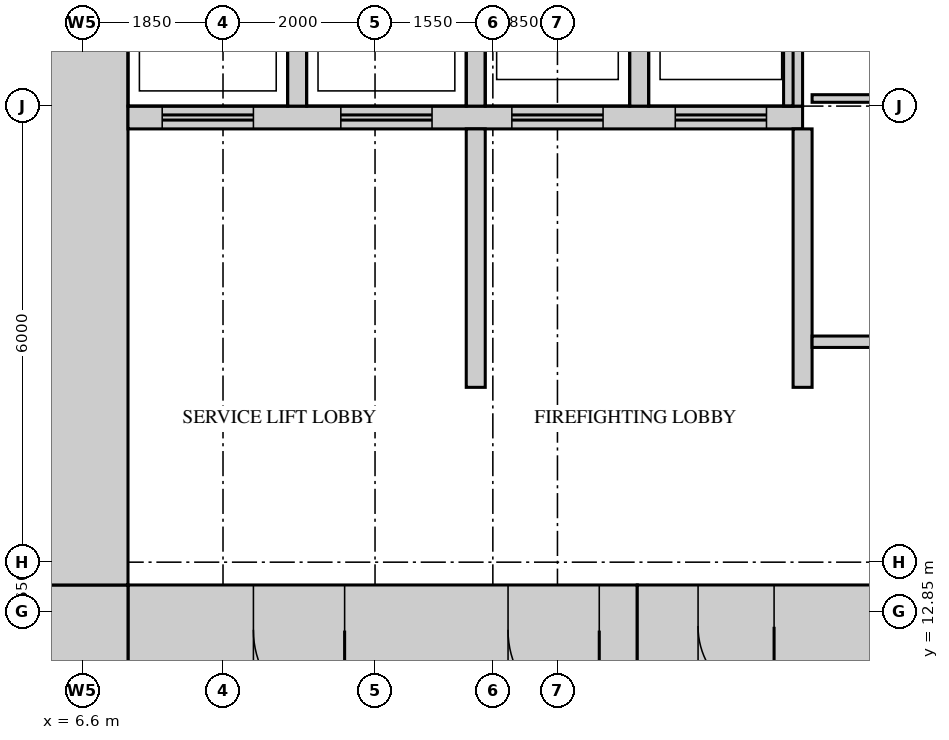
"""IFC4 building model, lengths in metres.
Left out: names, types, materials, properties, quantities, classifications, styles, units other than length and angle.
Written with IfcOpenShell. Run it as: python <this file> out.ifc"""

import sys

from ifc_helpers import new_model, si_unit, direction, frame, frame_2d, origin, place, context, subcontext, project, spatial, rectangle, extrude, source, transform, mapped, element, fill, save


model = new_model("IFC4")
c1 = context("Model", 3, precision=1e-05, world=origin(), true_north=direction((0.0, 1.0)))
c2 = subcontext(c1, "Body", "Model", "MODEL_VIEW")
j1 = project(units=[si_unit("LENGTHUNIT", "METRE"), si_unit("PLANEANGLEUNIT", "RADIAN")], contexts=[c1])
p1 = place(None, origin())
s1 = spatial("IfcSite", under=j1, at=p1, CompositionType="ELEMENT")
p2 = place(p1, origin())
s2 = spatial("IfcBuilding", under=s1, at=p2, CompositionType="ELEMENT")
p3 = place(p2, frame((0.0, 0.0, 51.0)))
s3 = spatial("IfcBuildingStorey", under=s2, at=p3, CompositionType="ELEMENT", Elevation=51.0)
m1 = source(origin(), c2, "Body", "SweptSolid", [
    extrude(rectangle(XDim=6.7, YDim=1.2, at=frame_2d((3.35, 0.0))), origin(), (0.0, 0.0, 1.0), 4.2),
])
p4 = place(p3, frame((7.2, 12.6, 0.0), z_axis=(0.0, 0.0, 1.0), x_axis=(1.0, 0.0, 0.0)))
e1 = element("IfcWall", 1, at=p4, inside=s3, PredefinedType="SHEAR", context=c2, shape_type="MappedRepresentation", body=[
    mapped(m1, transform((0.0, 0.0, 0.0))),
])
m2 = source(origin(), c2, "Body", "SweptSolid", [
    extrude(rectangle(XDim=1.2, YDim=2.1, at=frame_2d((0.6, 1.05))), frame((0.0, 0.61, 0.0), z_axis=(0.0, -1.0, 0.0), x_axis=(1.0, 0.0, 0.0)), (0.0, 0.0, 1.0), 1.22),
])
p5 = place(p4, frame((5.0, 0.0, 0.0)))
e2 = element("IfcOpeningElement", 2, at=p5, cuts=e1, PredefinedType="OPENING", context=c2, shape_type="MappedRepresentation", body=[
    mapped(m2, transform((0.0, 0.0, 0.0))),
])
p6 = place(p4, frame((1.65, 0.0, 0.0)))
e3 = element("IfcOpeningElement", 3, at=p6, cuts=e1, PredefinedType="OPENING", context=c2, shape_type="MappedRepresentation", body=[
    mapped(m2, transform((0.0, 0.0, 0.0))),
])
m3 = source(origin(), c2, "Body", "SweptSolid", [
    extrude(rectangle(XDim=7.2, YDim=1.1, at=frame_2d((3.6, 0.0))), origin(), (0.0, 0.0, 1.0), 4.2),
])
p7 = place(p3, frame((13.9, 12.65, 0.0), z_axis=(0.0, 0.0, 1.0), x_axis=(1.0, 0.0, 0.0)))
e4 = element("IfcWall", 4, at=p7, inside=s3, PredefinedType="SHEAR", context=c2, shape_type="MappedRepresentation", body=[
    mapped(m3, transform((0.0, 0.0, 0.0))),
])
m4 = source(origin(), c2, "Body", "SweptSolid", [
    extrude(rectangle(XDim=1.0, YDim=2.1, at=frame_2d((0.5, 1.05))), frame((0.0, 0.56, 0.0), z_axis=(0.0, -1.0, 0.0), x_axis=(1.0, 0.0, 0.0)), (0.0, 0.0, 1.0), 1.12),
])
p8 = place(p7, frame((0.8, 0.0, 0.0)))
e5 = element("IfcOpeningElement", 5, at=p8, cuts=e4, PredefinedType="OPENING", context=c2, shape_type="MappedRepresentation", body=[
    mapped(m4, transform((0.0, 0.0, 0.0))),
])
m5 = source(origin(), c2, "Body", "SweptSolid", [
    extrude(rectangle(XDim=1.2, YDim=1.2, at=frame_2d((0.6, 0.0))), origin(), (0.0, 0.0, 1.0), 4.2),
])
p9 = place(p3, frame((6.0, 12.6, 0.0), z_axis=(0.0, 0.0, 1.0), x_axis=(1.0, 0.0, 0.0)))
e6 = element("IfcWall", 6, at=p9, inside=s3, PredefinedType="SHEAR", context=c2, shape_type="MappedRepresentation", body=[
    mapped(m5, transform((0.0, 0.0, 0.0))),
])
m6 = source(origin(), c2, "Body", "SweptSolid", [
    extrude(rectangle(XDim=27.6, YDim=1.2, at=frame_2d((13.8, 0.0))), origin(), (0.0, 0.0, 1.0), 4.2),
])
p10 = place(p3, frame((6.6, 13.2, 0.0), z_axis=(0.0, 0.0, 1.0), x_axis=(0.0, 1.0, 0.0)))
e7 = element("IfcWall", 7, at=p10, inside=s3, PredefinedType="SHEAR", context=c2, shape_type="MappedRepresentation", body=[
    mapped(m6, transform((0.0, 0.0, 0.0))),
])
m7 = source(origin(), c2, "Body", "SweptSolid", [
    extrude(rectangle(XDim=8.875, YDim=0.3, at=frame_2d((4.438, 0.0))), origin(), (0.0, 0.0, 1.0), 4.2),
])
p11 = place(p3, frame((7.2, 19.35, 0.0), z_axis=(0.0, 0.0, 1.0), x_axis=(1.0, 0.0, 0.0)))
e8 = element("IfcWall", 8, at=p11, inside=s3, PredefinedType="STANDARD", context=c2, shape_type="MappedRepresentation", body=[
    mapped(m7, transform((0.0, 0.0, 0.0))),
])
m8 = source(origin(), c2, "Body", "SweptSolid", [
    extrude(rectangle(XDim=1.2, YDim=2.1, at=frame_2d((0.6, 1.05))), frame((0.0, 0.16, 0.0), z_axis=(0.0, -1.0, 0.0), x_axis=(1.0, 0.0, 0.0)), (0.0, 0.0, 1.0), 0.32),
])
p12 = place(p11, frame((0.45, 0.0, 0.0)))
e9 = element("IfcOpeningElement", 9, at=p12, cuts=e8, PredefinedType="OPENING", context=c2, shape_type="MappedRepresentation", body=[
    mapped(m8, transform((0.0, 0.0, 0.0))),
])
p13 = place(p11, frame((2.8, 0.0, 0.0)))
e10 = element("IfcOpeningElement", 10, at=p13, cuts=e8, PredefinedType="OPENING", context=c2, shape_type="MappedRepresentation", body=[
    mapped(m8, transform((0.0, 0.0, 0.0))),
])
p14 = place(p11, frame((5.05, 0.0, 0.0)))
e11 = element("IfcOpeningElement", 11, at=p14, cuts=e8, PredefinedType="OPENING", context=c2, shape_type="MappedRepresentation", body=[
    mapped(m8, transform((0.0, 0.0, 0.0))),
])
p15 = place(p11, frame((7.2, 0.0, 0.0)))
e12 = element("IfcOpeningElement", 12, at=p15, cuts=e8, PredefinedType="OPENING", context=c2, shape_type="MappedRepresentation", body=[
    mapped(m8, transform((0.0, 0.0, 0.0))),
])
m9 = source(origin(), c2, "Body", "SweptSolid", [
    extrude(rectangle(XDim=3.1, YDim=0.25, at=frame_2d((1.55, 0.0))), origin(), (0.0, 0.0, 1.0), 4.2),
])
for number, where, z_axis, x_axis in (
    (13, (9.425, 19.5, 0.0), (0.0, 0.0, 1.0), (0.0, 1.0, 0.0)),
    (14, (11.775, 19.5, 0.0), (0.0, 0.0, 1.0), (0.0, 1.0, 0.0)),
    (15, (13.925, 19.5, 0.0), (0.0, 0.0, 1.0), (0.0, 1.0, 0.0)),
    (16, (15.95, 19.5, 0.0), (0.0, 0.0, 1.0), (0.0, 1.0, 0.0)),
):
    element("IfcWall", number, at=place(p3, frame(where, z_axis=z_axis, x_axis=x_axis)), inside=s3, PredefinedType="STANDARD", context=c2, shape_type="MappedRepresentation", body=[
        mapped(m9, transform((0.0, 0.0, 0.0))),
    ])
m10 = source(origin(), c2, "Body", "SweptSolid", [
    extrude(rectangle(XDim=3.4, YDim=0.25, at=frame_2d((1.7, 0.0))), origin(), (0.0, 0.0, 1.0), 4.2),
])
for number, where, z_axis, x_axis in (
    (17, (16.075, 15.8, 0.0), (0.0, 0.0, 1.0), (0.0, 1.0, 0.0)),
    (18, (11.775, 15.8, 0.0), (0.0, 0.0, 1.0), (0.0, 1.0, 0.0)),
):
    element("IfcWall", number, at=place(p3, frame(where, z_axis=z_axis, x_axis=x_axis)), inside=s3, PredefinedType="STANDARD", context=c2, shape_type="MappedRepresentation", body=[
        mapped(m10, transform((0.0, 0.0, 0.0))),
    ])
m11 = source(origin(), c2, "Body", "SweptSolid", [
    extrude(rectangle(XDim=6.6, YDim=0.15, at=frame_2d((3.3, 0.0))), origin(), (0.0, 0.0, 1.0), 4.3),
])
p16 = place(p3, frame((16.2, 16.4, 0.0), z_axis=(0.0, 0.0, 1.0), x_axis=(1.0, 0.0, 0.0)))
e19 = element("IfcWall", 19, at=p16, inside=s3, PredefinedType="PARTITIONING", context=c2, shape_type="MappedRepresentation", body=[
    mapped(m11, transform((0.0, 0.0, 0.0))),
])
m12 = source(origin(), c2, "Body", "SweptSolid", [
    extrude(rectangle(XDim=6.6, YDim=0.1, at=frame_2d((3.3, 0.0))), origin(), (0.0, 0.0, 1.0), 4.3),
])
p17 = place(p3, frame((16.2, 19.6, 0.0), z_axis=(0.0, 0.0, 1.0), x_axis=(1.0, 0.0, 0.0)))
e20 = element("IfcWall", 20, at=p17, inside=s3, PredefinedType="PARTITIONING", context=c2, shape_type="MappedRepresentation", body=[
    mapped(m12, transform((0.0, 0.0, 0.0))),
])
m13 = source(origin(), c2, "Body", "SweptSolid", [
    extrude(rectangle(XDim=1.2, YDim=2.1, at=frame_2d((0.6, 1.05))), frame((0.0, 0.55, 0.0), z_axis=(0.0, -1.0, 0.0), x_axis=(1.0, 0.0, 0.0)), (0.0, 0.0, 1.0), 1.1),
])
p18 = place(p5, origin())
e21 = element("IfcDoor", 21, at=p18, inside=s3, OperationType="SINGLE_SWING_RIGHT", PredefinedType="DOOR", context=c2, shape_type="MappedRepresentation", body=[
    mapped(m13, transform((0.0, 0.0, 0.0))),
])
fill(e2, e21)
p19 = place(p6, origin())
e22 = element("IfcDoor", 22, at=p19, inside=s3, OperationType="SINGLE_SWING_RIGHT", PredefinedType="DOOR", context=c2, shape_type="MappedRepresentation", body=[
    mapped(m13, transform((0.0, 0.0, 0.0))),
])
fill(e3, e22)
m14 = source(origin(), c2, "Body", "SweptSolid", [
    extrude(rectangle(XDim=1.0, YDim=2.1, at=frame_2d((0.5, 1.05))), frame((0.0, 0.5, 0.0), z_axis=(0.0, -1.0, 0.0), x_axis=(1.0, 0.0, 0.0)), (0.0, 0.0, 1.0), 1.0),
])
p20 = place(p8, origin())
e23 = element("IfcDoor", 23, at=p20, inside=s3, OperationType="SINGLE_SWING_RIGHT", PredefinedType="DOOR", context=c2, shape_type="MappedRepresentation", body=[
    mapped(m14, transform((0.0, 0.0, 0.0))),
])
fill(e5, e23)
m15 = source(origin(), c2, "Body", "SweptSolid", [
    extrude(rectangle(XDim=1.2, YDim=2.1, at=frame_2d((0.6, 1.05))), frame((0.0, 0.025, 0.0), z_axis=(0.0, -1.0, 0.0), x_axis=(1.0, 0.0, 0.0)), (0.0, 0.0, 1.0), 0.05),
])
p21 = place(p12, origin())
e24 = element("IfcDoor", 24, at=p21, inside=s3, OperationType="DOUBLE_DOOR_SLIDING", PredefinedType="DOOR", context=c2, shape_type="MappedRepresentation", body=[
    mapped(m15, transform((0.0, 0.0, 0.0))),
])
fill(e9, e24)
p22 = place(p13, origin())
e25 = element("IfcDoor", 25, at=p22, inside=s3, OperationType="DOUBLE_DOOR_SLIDING", PredefinedType="DOOR", context=c2, shape_type="MappedRepresentation", body=[
    mapped(m15, transform((0.0, 0.0, 0.0))),
])
fill(e10, e25)
p23 = place(p14, origin())
e26 = element("IfcDoor", 26, at=p23, inside=s3, OperationType="DOUBLE_DOOR_SLIDING", PredefinedType="DOOR", context=c2, shape_type="MappedRepresentation", body=[
    mapped(m15, transform((0.0, 0.0, 0.0))),
])
fill(e11, e26)
p24 = place(p15, origin())
e27 = element("IfcDoor", 27, at=p24, inside=s3, OperationType="DOUBLE_DOOR_SLIDING", PredefinedType="DOOR", context=c2, shape_type="MappedRepresentation", body=[
    mapped(m15, transform((0.0, 0.0, 0.0))),
])
fill(e12, e27)
save(model, sys.argv[1])
